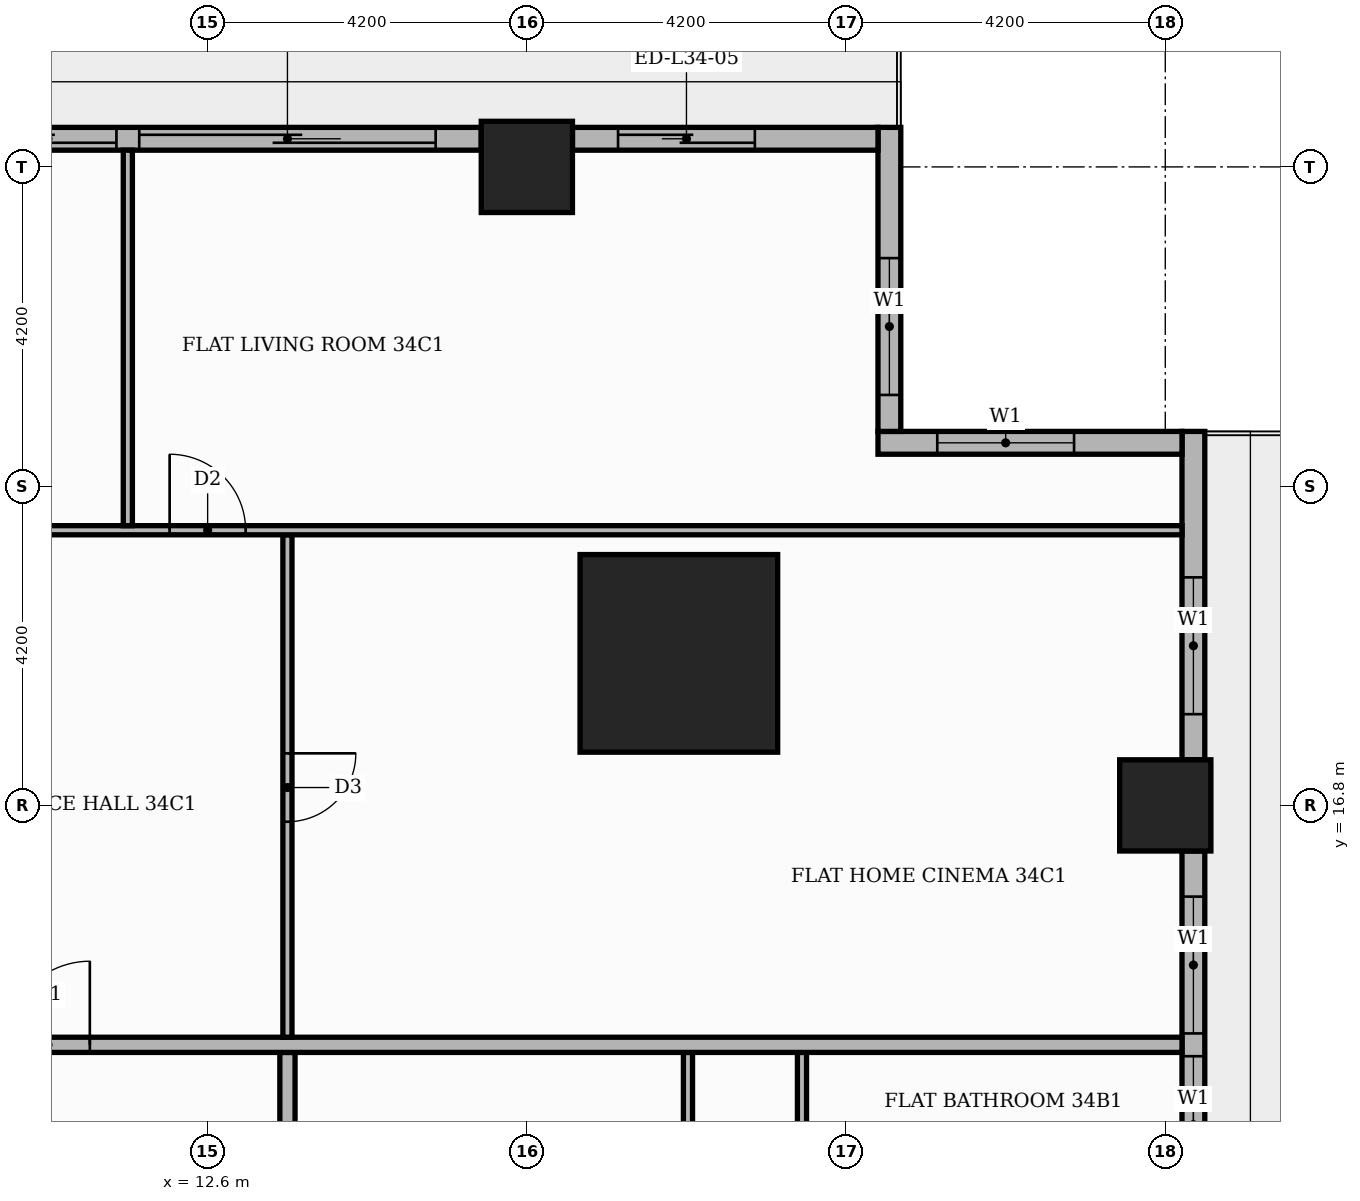
"""IFC4 building model, lengths in metres.
Left out: names, types, materials, properties, quantities, classifications, styles, units other than length and angle.
Written with IfcOpenShell. Run it as: python <this file> out.ifc"""

import sys

from ifc_helpers import new_model, si_unit, direction, frame, frame_2d, origin, origin_2d, place, context, subcontext, project, spatial, rectangle, extrude, element, fill, save


model = new_model("IFC4")
c1 = context("Model", 3, precision=1e-05, world=origin(), true_north=direction((0.0, 1.0)))
c2 = subcontext(c1, "Body", "Model", "MODEL_VIEW")
j1 = project(units=[si_unit("LENGTHUNIT", "METRE"), si_unit("PLANEANGLEUNIT", "RADIAN")], contexts=[c1])
p1 = place(None, origin())
s1 = spatial("IfcSite", under=j1, at=p1, CompositionType="ELEMENT")
p2 = place(p1, origin())
s2 = spatial("IfcBuilding", under=s1, at=p2, CompositionType="ELEMENT")
p3 = place(p2, frame((0.0, 0.0, 145.5)))
s3 = spatial("IfcBuildingStorey", under=s2, at=p3, CompositionType="ELEMENT", Elevation=145.5)
p4 = place(p3, frame((18.8, 18.8, 0.0), z_axis=(0.0, 0.0, 1.0), x_axis=(1.0, 0.0, 0.0)))
e1 = element("IfcColumn", 1, at=p4, inside=s3, PredefinedType="COLUMN", context=c2, shape_type="SweptSolid", body=[
    extrude(rectangle(XDim=2.6, YDim=2.6, at=origin_2d()), origin(), (0.0, 0.0, 1.0), 3.9),
])
for number, where, z_axis, x_axis in (
    (2, (25.2, 16.8, 0.0), (0.0, 0.0, 1.0), (1.0, 0.0, 0.0)),
    (3, (16.8, 25.2, 0.0), (0.0, 0.0, 1.0), (1.0, 0.0, 0.0)),
):
    element("IfcColumn", number, at=place(p3, frame(where, z_axis=z_axis, x_axis=x_axis)), inside=s3, PredefinedType="COLUMN", context=c2, shape_type="SweptSolid", body=[
        extrude(rectangle(XDim=1.2, YDim=1.2, at=origin_2d()), origin(), (0.0, 0.0, 1.0), 3.9),
    ])
p5 = place(p3, frame((25.57, 9.0, 0.0), z_axis=(0.0, 0.0, 1.0), x_axis=(0.0, 1.0, 0.0)))
e4 = element("IfcWall", 4, at=p5, inside=s3, PredefinedType="STANDARD", context=c2, shape_type="SweptSolid", body=[
    extrude(rectangle(XDim=7.2, YDim=0.3, at=frame_2d((3.6, 0.0))), origin(), (0.0, 0.0, 1.0), 3.48),
])
p6 = place(p5, frame((0.6, 0.0, 0.9)))
e5 = element("IfcOpeningElement", 5, at=p6, cuts=e4, PredefinedType="OPENING", context=c2, shape_type="SweptSolid", body=[
    extrude(rectangle(XDim=1.8, YDim=2.1, at=frame_2d((0.9, 1.05))), frame((0.0, 0.16, 0.0), z_axis=(0.0, -1.0, 0.0), x_axis=(1.0, 0.0, 0.0)), (0.0, 0.0, 1.0), 0.32),
])
p7 = place(p5, frame((2.7, 0.0, 0.9)))
e6 = element("IfcOpeningElement", 6, at=p7, cuts=e4, PredefinedType="OPENING", context=c2, shape_type="SweptSolid", body=[
    extrude(rectangle(XDim=1.8, YDim=2.1, at=frame_2d((0.9, 1.05))), frame((0.0, 0.16, 0.0), z_axis=(0.0, -1.0, 0.0), x_axis=(1.0, 0.0, 0.0)), (0.0, 0.0, 1.0), 0.32),
])
p8 = place(p5, frame((4.8, 0.0, 0.9)))
e7 = element("IfcOpeningElement", 7, at=p8, cuts=e4, PredefinedType="OPENING", context=c2, shape_type="SweptSolid", body=[
    extrude(rectangle(XDim=1.8, YDim=2.1, at=frame_2d((0.9, 1.05))), frame((0.0, 0.16, 0.0), z_axis=(0.0, -1.0, 0.0), x_axis=(1.0, 0.0, 0.0)), (0.0, 0.0, 1.0), 0.32),
])
p9 = place(p3, frame((25.57, 17.4, 0.0), z_axis=(0.0, 0.0, 1.0), x_axis=(0.0, 1.0, 0.0)))
e8 = element("IfcWall", 8, at=p9, inside=s3, PredefinedType="STANDARD", context=c2, shape_type="SweptSolid", body=[
    extrude(rectangle(XDim=4.32, YDim=0.3, at=frame_2d((2.16, 0.0))), origin(), (0.0, 0.0, 1.0), 3.48),
])
p10 = place(p9, frame((0.6, 0.0, 0.9)))
e9 = element("IfcOpeningElement", 9, at=p10, cuts=e8, PredefinedType="OPENING", context=c2, shape_type="SweptSolid", body=[
    extrude(rectangle(XDim=1.8, YDim=2.1, at=frame_2d((0.9, 1.05))), frame((0.0, 0.16, 0.0), z_axis=(0.0, -1.0, 0.0), x_axis=(1.0, 0.0, 0.0)), (0.0, 0.0, 1.0), 0.32),
])
p11 = place(p3, frame((25.42, 21.57, 0.0), z_axis=(0.0, 0.0, 1.0), x_axis=(-1.0, 0.0, 0.0)))
e10 = element("IfcWall", 10, at=p11, inside=s3, PredefinedType="STANDARD", context=c2, shape_type="SweptSolid", body=[
    extrude(rectangle(XDim=4.0, YDim=0.3, at=frame_2d((2.0, 0.0))), origin(), (0.0, 0.0, 1.0), 3.48),
])
p12 = place(p11, frame((1.42, 0.0, 0.9)))
e11 = element("IfcOpeningElement", 11, at=p12, cuts=e10, PredefinedType="OPENING", context=c2, shape_type="SweptSolid", body=[
    extrude(rectangle(XDim=1.8, YDim=2.1, at=frame_2d((0.9, 1.05))), frame((0.0, 0.16, 0.0), z_axis=(0.0, -1.0, 0.0), x_axis=(1.0, 0.0, 0.0)), (0.0, 0.0, 1.0), 0.32),
])
p13 = place(p3, frame((21.57, 21.72, 0.0), z_axis=(0.0, 0.0, 1.0), x_axis=(0.0, 1.0, 0.0)))
e12 = element("IfcWall", 12, at=p13, inside=s3, PredefinedType="STANDARD", context=c2, shape_type="SweptSolid", body=[
    extrude(rectangle(XDim=4.0, YDim=0.3, at=frame_2d((2.0, 0.0))), origin(), (0.0, 0.0, 1.0), 3.48),
])
p14 = place(p13, frame((0.48, 0.0, 0.9)))
e13 = element("IfcOpeningElement", 13, at=p14, cuts=e12, PredefinedType="OPENING", context=c2, shape_type="SweptSolid", body=[
    extrude(rectangle(XDim=1.8, YDim=2.1, at=frame_2d((0.9, 1.05))), frame((0.0, 0.16, 0.0), z_axis=(0.0, -1.0, 0.0), x_axis=(1.0, 0.0, 0.0)), (0.0, 0.0, 1.0), 0.32),
])
p15 = place(p3, frame((21.42, 25.57, 0.0), z_axis=(0.0, 0.0, 1.0), x_axis=(-1.0, 0.0, 0.0)))
e14 = element("IfcWall", 14, at=p15, inside=s3, PredefinedType="STANDARD", context=c2, shape_type="SweptSolid", body=[
    extrude(rectangle(XDim=4.02, YDim=0.3, at=frame_2d((2.01, 0.0))), origin(), (0.0, 0.0, 1.0), 3.48),
])
p16 = place(p15, frame((1.62, 0.0, 0.0)))
e15 = element("IfcOpeningElement", 15, at=p16, cuts=e14, PredefinedType="OPENING", context=c2, shape_type="SweptSolid", body=[
    extrude(rectangle(XDim=1.8, YDim=2.4, at=frame_2d((0.9, 1.2))), frame((0.0, 0.16, 0.0), z_axis=(0.0, -1.0, 0.0), x_axis=(1.0, 0.0, 0.0)), (0.0, 0.0, 1.0), 0.32),
])
p17 = place(p3, frame((16.2, 25.57, 0.0), z_axis=(0.0, 0.0, 1.0), x_axis=(-1.0, 0.0, 0.0)))
e16 = element("IfcWall", 16, at=p17, inside=s3, PredefinedType="STANDARD", context=c2, shape_type="SweptSolid", body=[
    extrude(rectangle(XDim=7.2, YDim=0.3, at=frame_2d((3.6, 0.0))), origin(), (0.0, 0.0, 1.0), 3.48),
])
p18 = place(p17, frame((0.6, 0.0, 0.0)))
e17 = element("IfcOpeningElement", 17, at=p18, cuts=e16, PredefinedType="OPENING", context=c2, shape_type="SweptSolid", body=[
    extrude(rectangle(XDim=3.9, YDim=2.4, at=frame_2d((1.95, 1.2))), frame((0.0, 0.16, 0.0), z_axis=(0.0, -1.0, 0.0), x_axis=(1.0, 0.0, 0.0)), (0.0, 0.0, 1.0), 0.32),
])
p19 = place(p17, frame((4.8, 0.0, 0.0)))
e18 = element("IfcOpeningElement", 18, at=p19, cuts=e16, PredefinedType="OPENING", context=c2, shape_type="SweptSolid", body=[
    extrude(rectangle(XDim=1.8, YDim=2.4, at=frame_2d((0.9, 1.2))), frame((0.0, 0.16, 0.0), z_axis=(0.0, -1.0, 0.0), x_axis=(1.0, 0.0, 0.0)), (0.0, 0.0, 1.0), 0.32),
])
p20 = place(p3, frame((18.92, 9.51, 0.0), z_axis=(0.0, 0.0, 1.0), x_axis=(0.0, 1.0, 0.0)))
e19 = element("IfcWall", 19, at=p20, inside=s3, PredefinedType="PARTITIONING", context=c2, shape_type="SweptSolid", body=[
    extrude(rectangle(XDim=4.04, YDim=0.12, at=frame_2d((2.02, 0.0))), origin(), (0.0, 0.0, 1.0), 3.48),
])
p21 = place(p20, frame((1.59, 0.0, 0.0)))
e20 = element("IfcOpeningElement", 20, at=p21, cuts=e19, PredefinedType="OPENING", context=c2, shape_type="SweptSolid", body=[
    extrude(rectangle(XDim=0.9, YDim=2.1, at=frame_2d((0.45, 1.05))), frame((0.0, 0.07, 0.0), z_axis=(0.0, -1.0, 0.0), x_axis=(1.0, 0.0, 0.0)), (0.0, 0.0, 1.0), 0.14),
])
p22 = place(p3, frame((13.65, 11.1, 0.0), z_axis=(0.0, 0.0, 1.0), x_axis=(0.0, 1.0, 0.0)))
e21 = element("IfcWall", 21, at=p22, inside=s3, PredefinedType="PARTITIONING", context=c2, shape_type="SweptSolid", body=[
    extrude(rectangle(XDim=2.45, YDim=0.2, at=frame_2d((1.225, 0.0))), origin(), (0.0, 0.0, 1.0), 3.48),
])
p23 = place(p3, frame((20.42, 11.61, 0.0), z_axis=(0.0, 0.0, 1.0), x_axis=(0.0, 1.0, 0.0)))
e22 = element("IfcWall", 22, at=p23, inside=s3, PredefinedType="PARTITIONING", context=c2, shape_type="SweptSolid", body=[
    extrude(rectangle(XDim=1.94, YDim=0.12, at=frame_2d((0.97, 0.0))), origin(), (0.0, 0.0, 1.0), 3.48),
])
p24 = place(p3, frame((-13.65, 13.65, 0.0), z_axis=(0.0, 0.0, 1.0), x_axis=(1.0, 0.0, 0.0)))
e23 = element("IfcWall", 23, at=p24, inside=s3, PredefinedType="PARTITIONING", context=c2, shape_type="SweptSolid", body=[
    extrude(rectangle(XDim=39.07, YDim=0.2, at=frame_2d((19.535, 0.0))), origin(), (0.0, 0.0, 1.0), 3.48),
])
p25 = place(p24, frame((23.6, 0.0, 0.0)))
e24 = element("IfcOpeningElement", 24, at=p25, cuts=e23, PredefinedType="OPENING", context=c2, shape_type="SweptSolid", body=[
    extrude(rectangle(XDim=1.1, YDim=2.4, at=frame_2d((0.55, 1.2))), frame((0.0, 0.11, 0.0), z_axis=(0.0, -1.0, 0.0), x_axis=(1.0, 0.0, 0.0)), (0.0, 0.0, 1.0), 0.22),
])
p26 = place(p3, frame((13.65, 13.75, 0.0), z_axis=(0.0, 0.0, 1.0), x_axis=(0.0, 1.0, 0.0)))
e25 = element("IfcWall", 25, at=p26, inside=s3, PredefinedType="PARTITIONING", context=c2, shape_type="SweptSolid", body=[
    extrude(rectangle(XDim=6.61, YDim=0.12, at=frame_2d((3.305, 0.0))), origin(), (0.0, 0.0, 1.0), 3.48),
])
p27 = place(p26, frame((2.835, 0.0, 0.0)))
e26 = element("IfcOpeningElement", 26, at=p27, cuts=e25, PredefinedType="OPENING", context=c2, shape_type="SweptSolid", body=[
    extrude(rectangle(XDim=0.9, YDim=2.1, at=frame_2d((0.45, 1.05))), frame((0.0, 0.07, 0.0), z_axis=(0.0, -1.0, 0.0), x_axis=(1.0, 0.0, 0.0)), (0.0, 0.0, 1.0), 0.14),
])
p28 = place(p3, frame((5.25, 20.42, 0.0), z_axis=(0.0, 0.0, 1.0), x_axis=(1.0, 0.0, 0.0)))
e27 = element("IfcWall", 27, at=p28, inside=s3, PredefinedType="PARTITIONING", context=c2, shape_type="SweptSolid", body=[
    extrude(rectangle(XDim=20.17, YDim=0.12, at=frame_2d((10.085, 0.0))), origin(), (0.0, 0.0, 1.0), 3.48),
])
p29 = place(p28, frame((6.85, 0.0, 0.0)))
e28 = element("IfcOpeningElement", 28, at=p29, cuts=e27, PredefinedType="OPENING", context=c2, shape_type="SweptSolid", body=[
    extrude(rectangle(XDim=1.0, YDim=2.1, at=frame_2d((0.5, 1.05))), frame((0.0, 0.07, 0.0), z_axis=(0.0, -1.0, 0.0), x_axis=(1.0, 0.0, 0.0)), (0.0, 0.0, 1.0), 0.14),
])
p30 = place(p28, frame((2.65, 0.0, 0.0)))
e29 = element("IfcOpeningElement", 29, at=p30, cuts=e27, PredefinedType="OPENING", context=c2, shape_type="SweptSolid", body=[
    extrude(rectangle(XDim=1.0, YDim=2.1, at=frame_2d((0.5, 1.05))), frame((0.0, 0.07, 0.0), z_axis=(0.0, -1.0, 0.0), x_axis=(1.0, 0.0, 0.0)), (0.0, 0.0, 1.0), 0.14),
])
p31 = place(p3, frame((11.55, 20.48, 0.0), z_axis=(0.0, 0.0, 1.0), x_axis=(0.0, 1.0, 0.0)))
e30 = element("IfcWall", 30, at=p31, inside=s3, PredefinedType="PARTITIONING", context=c2, shape_type="SweptSolid", body=[
    extrude(rectangle(XDim=4.94, YDim=0.12, at=frame_2d((2.47, 0.0))), origin(), (0.0, 0.0, 1.0), 3.48),
])
p32 = place(p7, origin())
e31 = element("IfcWindow", 31, at=p32, inside=s3, PartitioningType="SINGLE_PANEL", PredefinedType="WINDOW", context=c2, shape_type="SweptSolid", body=[
    extrude(rectangle(XDim=1.8, YDim=2.1, at=frame_2d((0.9, 1.05))), frame((0.0, 0.03, 0.0), z_axis=(0.0, -1.0, 0.0), x_axis=(1.0, 0.0, 0.0)), (0.0, 0.0, 1.0), 0.06),
])
fill(e6, e31)
p33 = place(p8, origin())
e32 = element("IfcWindow", 32, at=p33, inside=s3, PartitioningType="SINGLE_PANEL", PredefinedType="WINDOW", context=c2, shape_type="SweptSolid", body=[
    extrude(rectangle(XDim=1.8, YDim=2.1, at=frame_2d((0.9, 1.05))), frame((0.0, 0.03, 0.0), z_axis=(0.0, -1.0, 0.0), x_axis=(1.0, 0.0, 0.0)), (0.0, 0.0, 1.0), 0.06),
])
fill(e7, e32)
p34 = place(p10, origin())
e33 = element("IfcWindow", 33, at=p34, inside=s3, PartitioningType="SINGLE_PANEL", PredefinedType="WINDOW", context=c2, shape_type="SweptSolid", body=[
    extrude(rectangle(XDim=1.8, YDim=2.1, at=frame_2d((0.9, 1.05))), frame((0.0, 0.03, 0.0), z_axis=(0.0, -1.0, 0.0), x_axis=(1.0, 0.0, 0.0)), (0.0, 0.0, 1.0), 0.06),
])
fill(e9, e33)
p35 = place(p12, origin())
e34 = element("IfcWindow", 34, at=p35, inside=s3, PartitioningType="SINGLE_PANEL", PredefinedType="WINDOW", context=c2, shape_type="SweptSolid", body=[
    extrude(rectangle(XDim=1.8, YDim=2.1, at=frame_2d((0.9, 1.05))), frame((0.0, 0.03, 0.0), z_axis=(0.0, -1.0, 0.0), x_axis=(1.0, 0.0, 0.0)), (0.0, 0.0, 1.0), 0.06),
])
fill(e11, e34)
p36 = place(p14, origin())
e35 = element("IfcWindow", 35, at=p36, inside=s3, PartitioningType="SINGLE_PANEL", PredefinedType="WINDOW", context=c2, shape_type="SweptSolid", body=[
    extrude(rectangle(XDim=1.8, YDim=2.1, at=frame_2d((0.9, 1.05))), frame((0.0, 0.03, 0.0), z_axis=(0.0, -1.0, 0.0), x_axis=(1.0, 0.0, 0.0)), (0.0, 0.0, 1.0), 0.06),
])
fill(e13, e35)
p37 = place(p16, origin())
e36 = element("IfcDoor", 36, at=p37, inside=s3, OperationType="SLIDING_TO_RIGHT", PredefinedType="DOOR", context=c2, shape_type="SweptSolid", body=[
    extrude(rectangle(XDim=1.8, YDim=2.4, at=frame_2d((0.9, 1.2))), frame((0.0, 0.025, 0.0), z_axis=(0.0, -1.0, 0.0), x_axis=(1.0, 0.0, 0.0)), (0.0, 0.0, 1.0), 0.05),
])
fill(e15, e36)
p38 = place(p18, origin())
e37 = element("IfcDoor", 37, at=p38, inside=s3, OperationType="SLIDING_TO_LEFT", PredefinedType="DOOR", context=c2, shape_type="SweptSolid", body=[
    extrude(rectangle(XDim=3.9, YDim=2.4, at=frame_2d((1.95, 1.2))), frame((0.0, 0.025, 0.0), z_axis=(0.0, -1.0, 0.0), x_axis=(1.0, 0.0, 0.0)), (0.0, 0.0, 1.0), 0.05),
])
fill(e17, e37)
p39 = place(p19, origin())
e38 = element("IfcDoor", 38, at=p39, inside=s3, OperationType="SLIDING_TO_RIGHT", PredefinedType="DOOR", context=c2, shape_type="SweptSolid", body=[
    extrude(rectangle(XDim=1.8, YDim=2.4, at=frame_2d((0.9, 1.2))), frame((0.0, 0.025, 0.0), z_axis=(0.0, -1.0, 0.0), x_axis=(1.0, 0.0, 0.0)), (0.0, 0.0, 1.0), 0.05),
])
fill(e18, e38)
p40 = place(p25, origin())
e39 = element("IfcDoor", 39, at=p40, inside=s3, OperationType="SINGLE_SWING_RIGHT", PredefinedType="DOOR", context=c2, shape_type="SweptSolid", body=[
    extrude(rectangle(XDim=1.1, YDim=2.4, at=frame_2d((0.55, 1.2))), frame((0.0, 0.025, 0.0), z_axis=(0.0, -1.0, 0.0), x_axis=(1.0, 0.0, 0.0)), (0.0, 0.0, 1.0), 0.05),
])
fill(e24, e39)
p41 = place(p27, frame((0.9, 0.0, 0.0), z_axis=(0.0, 0.0, 1.0), x_axis=(-1.0, 0.0, 0.0)))
e40 = element("IfcDoor", 40, at=p41, inside=s3, OperationType="SINGLE_SWING_RIGHT", PredefinedType="DOOR", context=c2, shape_type="SweptSolid", body=[
    extrude(rectangle(XDim=0.9, YDim=2.1, at=frame_2d((0.45, 1.05))), frame((0.0, 0.025, 0.0), z_axis=(0.0, -1.0, 0.0), x_axis=(1.0, 0.0, 0.0)), (0.0, 0.0, 1.0), 0.05),
])
fill(e26, e40)
p42 = place(p29, origin())
e41 = element("IfcDoor", 41, at=p42, inside=s3, OperationType="SINGLE_SWING_LEFT", PredefinedType="DOOR", context=c2, shape_type="SweptSolid", body=[
    extrude(rectangle(XDim=1.0, YDim=2.1, at=frame_2d((0.5, 1.05))), frame((0.0, 0.025, 0.0), z_axis=(0.0, -1.0, 0.0), x_axis=(1.0, 0.0, 0.0)), (0.0, 0.0, 1.0), 0.05),
])
fill(e28, e41)
save(model, sys.argv[1])
